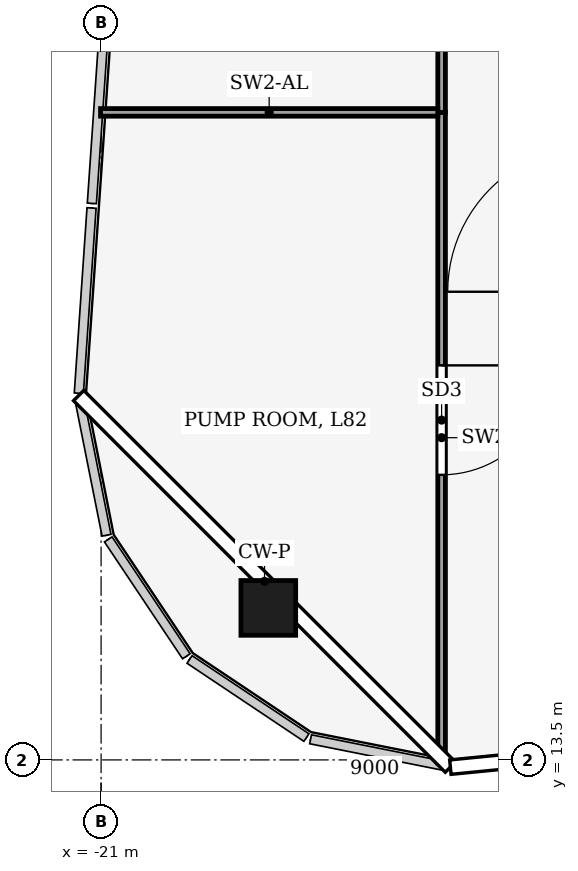
"""IFC4 building model, lengths in metres.
Left out: names, types, materials, properties, quantities, classifications, styles, units other than length and angle.
Written with IfcOpenShell. Run it as: python <this file> out.ifc"""

import sys

from ifc_helpers import new_model, si_unit, direction, frame, frame_2d, origin, origin_2d, place, context, subcontext, project, spatial, rectangle, hollow_rectangle, extrude, element, fill, save


model = new_model("IFC4")
c1 = context("Model", 3, precision=1e-05, world=origin(), true_north=direction((0.0, 1.0)))
c2 = subcontext(c1, "Body", "Model", "MODEL_VIEW")
j1 = project(units=[si_unit("LENGTHUNIT", "METRE"), si_unit("PLANEANGLEUNIT", "RADIAN")], contexts=[c1])
p1 = place(None, origin())
s1 = spatial("IfcSite", under=j1, at=p1, CompositionType="ELEMENT")
p2 = place(p1, origin())
s2 = spatial("IfcBuilding", under=s1, at=p2, CompositionType="ELEMENT")
p3 = place(p2, frame((0.0, 0.0, 364.0)))
s3 = spatial("IfcBuildingStorey", under=s2, at=p3, CompositionType="ELEMENT", Elevation=364.0)
p4 = place(p3, frame((-18.25, 16.0, 0.0), z_axis=(0.0, 0.0, 1.0), x_axis=(1.0, 0.0, 0.0)))
e1 = element("IfcColumn", 1, at=p4, inside=s3, PredefinedType="COLUMN", context=c2, shape_type="SweptSolid", body=[
    extrude(hollow_rectangle(XDim=0.9, YDim=0.9, WallThickness=0.04, at=origin_2d()), origin(), (0.0, 0.0, 1.0), 4.0),
])
p5 = place(p3, frame((-15.4, 24.15, 0.0), z_axis=(0.0, 0.0, 1.0), x_axis=(0.0, -1.0, 0.0)))
e2 = element("IfcWall", 2, at=p5, inside=s3, PredefinedType="PARTITIONING", context=c2, shape_type="SweptSolid", body=[
    extrude(rectangle(XDim=10.7, YDim=0.125, at=frame_2d((5.35, 0.0))), origin(), (0.0, 0.0, 1.0), 2.812),
])
p6 = place(p5, frame((4.161, 0.0, 0.0)))
e3 = element("IfcOpeningElement", 3, at=p6, cuts=e2, PredefinedType="OPENING", context=c2, shape_type="SweptSolid", body=[
    extrude(rectangle(XDim=1.8, YDim=2.4, at=frame_2d((0.9, 1.2))), frame((0.0, 0.073, 0.0), z_axis=(0.0, -1.0, 0.0), x_axis=(1.0, 0.0, 0.0)), (0.0, 0.0, 1.0), 0.145),
])
p7 = place(p3, frame((-15.4, 34.3, 0.0), z_axis=(0.0, 0.0, 1.0), x_axis=(0.0, -1.0, 0.0)))
e4 = element("IfcWall", 4, at=p7, inside=s3, PredefinedType="PARTITIONING", context=c2, shape_type="SweptSolid", body=[
    extrude(rectangle(XDim=10.15, YDim=0.125, at=frame_2d((5.075, 0.0))), origin(), (0.0, 0.0, 1.0), 3.52),
])
p8 = place(p7, frame((1.85, 0.0, 0.0)))
e5 = element("IfcOpeningElement", 5, at=p8, cuts=e4, PredefinedType="OPENING", context=c2, shape_type="SweptSolid", body=[
    extrude(rectangle(XDim=1.8, YDim=2.4, at=frame_2d((0.9, 1.2))), frame((0.0, 0.073, 0.0), z_axis=(0.0, -1.0, 0.0), x_axis=(1.0, 0.0, 0.0)), (0.0, 0.0, 1.0), 0.145),
])
p9 = place(p3, frame((-21.009, 24.15, 0.0), z_axis=(0.0, 0.0, 1.0), x_axis=(1.0, 0.0, 0.0)))
e6 = element("IfcWall", 6, at=p9, inside=s3, PredefinedType="PARTITIONING", context=c2, shape_type="SweptSolid", body=[
    extrude(rectangle(XDim=5.547, YDim=0.125, at=frame_2d((2.773, 0.0))), origin(), (0.0, 0.0, 1.0), 3.02),
])
p10 = place(p6, origin())
e7 = element("IfcDoor", 7, at=p10, inside=s3, OperationType="DOUBLE_DOOR_SINGLE_SWING", PredefinedType="DOOR", context=c2, shape_type="SweptSolid", body=[
    extrude(rectangle(XDim=1.8, YDim=2.4, at=frame_2d((0.9, 1.2))), frame((0.0, 0.025, 0.0), z_axis=(0.0, -1.0, 0.0), x_axis=(1.0, 0.0, 0.0)), (0.0, 0.0, 1.0), 0.05),
])
fill(e3, e7)
save(model, sys.argv[1])
